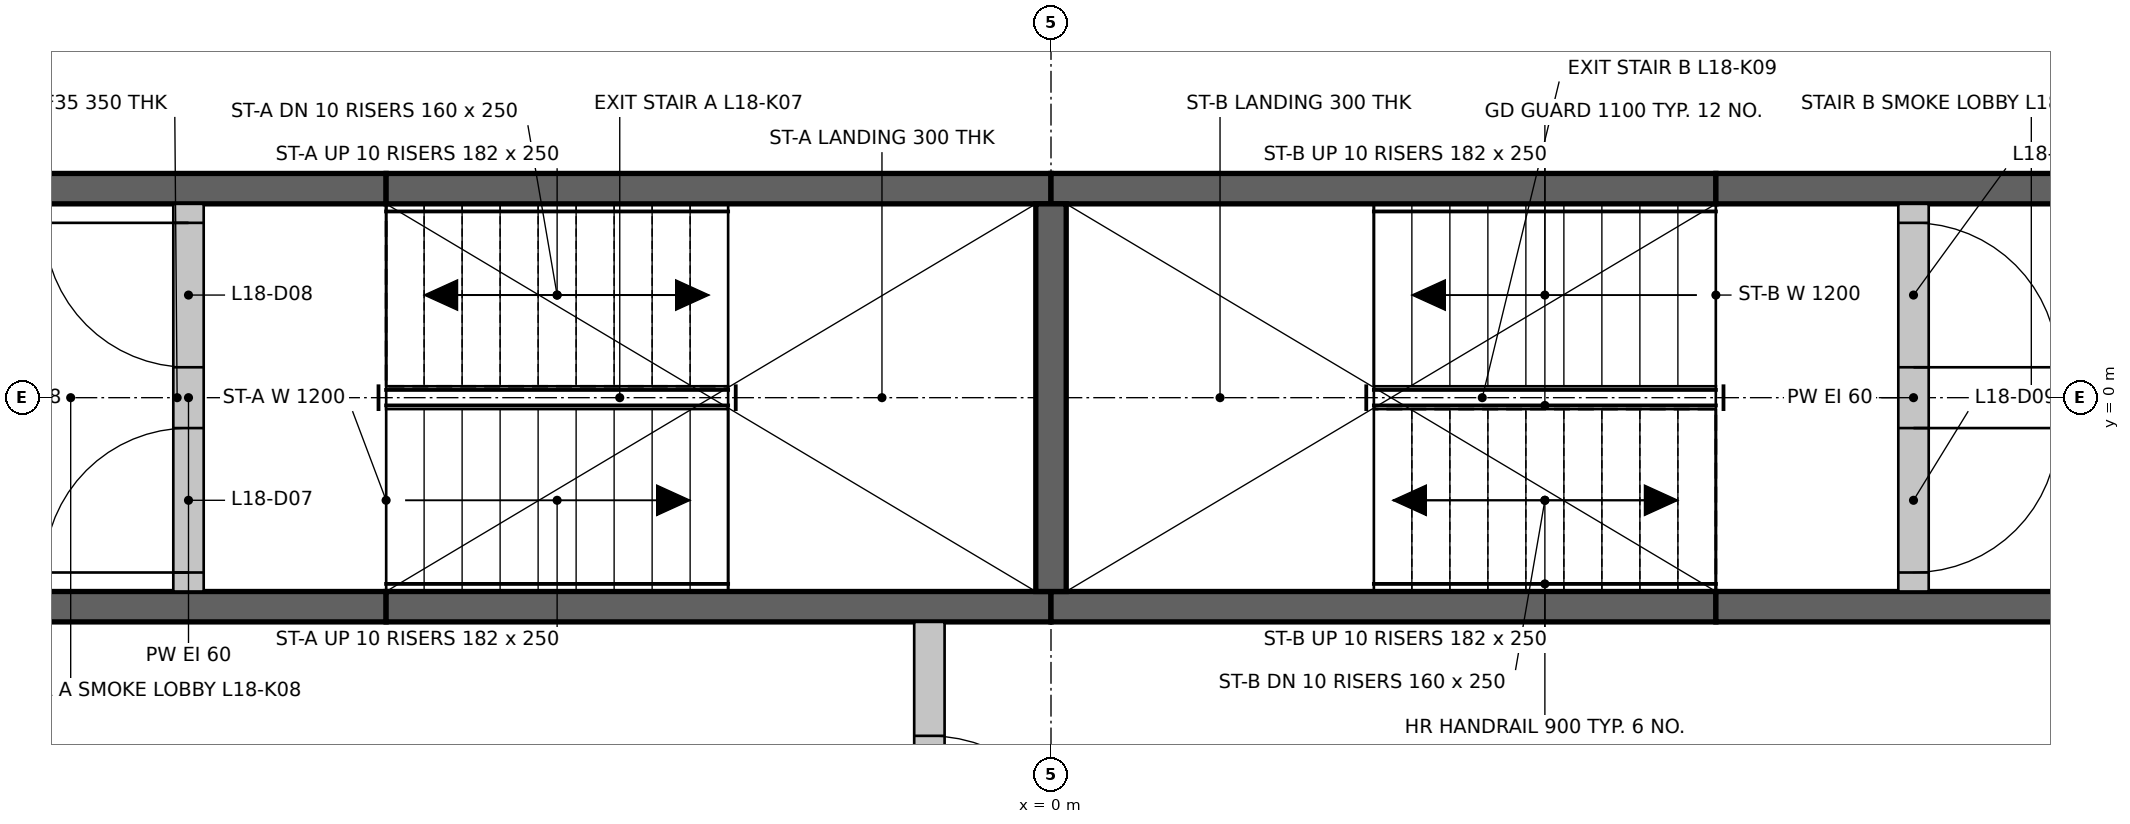
"""IFC4 building model, lengths in metres.
Left out: names, types, materials, properties, quantities, classifications, styles, units other than length and angle.
Written with IfcOpenShell. Run it as: python <this file> out.ifc"""

import sys

from ifc_helpers import new_model, si_unit, direction, frame, frame_2d, origin, place, context, subcontext, project, spatial, rectangle, extrude, element, fill, save


model = new_model("IFC4")
c1 = context("Model", 3, precision=1e-05, world=origin(), true_north=direction((0.0, 1.0)))
c2 = subcontext(c1, "Body", "Model", "MODEL_VIEW")
j1 = project(units=[si_unit("LENGTHUNIT", "METRE"), si_unit("PLANEANGLEUNIT", "RADIAN")], contexts=[c1])
p1 = place(None, origin())
s1 = spatial("IfcSite", under=j1, at=p1, CompositionType="ELEMENT")
p2 = place(p1, origin())
s2 = spatial("IfcBuilding", under=s1, at=p2, CompositionType="ELEMENT")
p3 = place(p2, frame((0.0, 0.0, 72.75)))
s3 = spatial("IfcBuildingStorey", under=s2, at=p3, CompositionType="ELEMENT", Elevation=72.75)
p4 = place(p3, frame((-7.124, -1.375, 0.0), z_axis=(0.0, 0.0, 1.0), x_axis=(1.0, 0.0, 0.0)))
e1 = element("IfcWall", 1, at=p4, inside=s3, PredefinedType="SHEAR", context=c2, shape_type="SweptSolid", body=[
    extrude(rectangle(XDim=2.75, YDim=0.2, at=frame_2d((1.375, 0.0))), origin(), (0.0, 0.0, 1.0), 3.3),
])
for number, where, z_axis, x_axis in (
    (2, (-4.374, -1.375, 0.0), (0.0, 0.0, 1.0), (1.0, 0.0, 0.0)),
    (3, (0.0, -1.375, 0.0), (0.0, 0.0, 1.0), (1.0, 0.0, 0.0)),
):
    element("IfcWall", number, at=place(p3, frame(where, z_axis=z_axis, x_axis=x_axis)), inside=s3, PredefinedType="SHEAR", context=c2, shape_type="SweptSolid", body=[
        extrude(rectangle(XDim=4.374, YDim=0.2, at=frame_2d((2.187, 0.0))), origin(), (0.0, 0.0, 1.0), 3.3),
    ])
for number, where, z_axis, x_axis in (
    (4, (4.374, -1.375, 0.0), (0.0, 0.0, 1.0), (1.0, 0.0, 0.0)),
    (5, (-7.124, 1.375, 0.0), (0.0, 0.0, 1.0), (1.0, 0.0, 0.0)),
):
    element("IfcWall", number, at=place(p3, frame(where, z_axis=z_axis, x_axis=x_axis)), inside=s3, PredefinedType="SHEAR", context=c2, shape_type="SweptSolid", body=[
        extrude(rectangle(XDim=2.75, YDim=0.2, at=frame_2d((1.375, 0.0))), origin(), (0.0, 0.0, 1.0), 3.3),
    ])
for number, where, z_axis, x_axis in (
    (6, (-4.374, 1.375, 0.0), (0.0, 0.0, 1.0), (1.0, 0.0, 0.0)),
    (7, (0.0, 1.375, 0.0), (0.0, 0.0, 1.0), (1.0, 0.0, 0.0)),
):
    element("IfcWall", number, at=place(p3, frame(where, z_axis=z_axis, x_axis=x_axis)), inside=s3, PredefinedType="SHEAR", context=c2, shape_type="SweptSolid", body=[
        extrude(rectangle(XDim=4.374, YDim=0.2, at=frame_2d((2.187, 0.0))), origin(), (0.0, 0.0, 1.0), 3.3),
    ])
p5 = place(p3, frame((4.374, 1.375, 0.0), z_axis=(0.0, 0.0, 1.0), x_axis=(1.0, 0.0, 0.0)))
e8 = element("IfcWall", 8, at=p5, inside=s3, PredefinedType="SHEAR", context=c2, shape_type="SweptSolid", body=[
    extrude(rectangle(XDim=2.75, YDim=0.2, at=frame_2d((1.375, 0.0))), origin(), (0.0, 0.0, 1.0), 3.3),
])
p6 = place(p3, frame((0.0, -1.275, 0.0), z_axis=(0.0, 0.0, 1.0), x_axis=(0.0, 1.0, 0.0)))
e9 = element("IfcWall", 9, at=p6, inside=s3, PredefinedType="SHEAR", context=c2, shape_type="SweptSolid", body=[
    extrude(rectangle(XDim=2.55, YDim=0.2, at=frame_2d((1.275, 0.0))), origin(), (0.0, 0.0, 1.0), 3.3),
])
p7 = place(p3, frame((-0.8, -3.974, 0.0), z_axis=(0.0, 0.0, 1.0), x_axis=(0.0, 1.0, 0.0)))
e10 = element("IfcWall", 10, at=p7, inside=s3, PredefinedType="PARTITIONING", context=c2, shape_type="SweptSolid", body=[
    extrude(rectangle(XDim=2.499, YDim=0.2, at=frame_2d((1.25, 0.0))), origin(), (0.0, 0.0, 1.0), 3.3),
])
p8 = place(p7, frame((0.75, 0.0, 0.0)))
e11 = element("IfcOpeningElement", 11, at=p8, cuts=e10, PredefinedType="OPENING", context=c2, shape_type="SweptSolid", body=[
    extrude(rectangle(XDim=1.0, YDim=2.1, at=frame_2d((0.5, 1.05))), frame((0.0, 0.11, 0.0), z_axis=(0.0, -1.0, 0.0), x_axis=(1.0, 0.0, 0.0)), (0.0, 0.0, 1.0), 0.22),
])
p9 = place(p3, frame((-5.674, -1.275, 0.0), z_axis=(0.0, 0.0, 1.0), x_axis=(0.0, 1.0, 0.0)))
e12 = element("IfcWall", 12, at=p9, inside=s3, PredefinedType="PARTITIONING", context=c2, shape_type="SweptSolid", body=[
    extrude(rectangle(XDim=2.55, YDim=0.2, at=frame_2d((1.275, 0.0))), origin(), (0.0, 0.0, 1.0), 3.3),
])
p10 = place(p9, frame((0.125, 0.0, 0.0)))
e13 = element("IfcOpeningElement", 13, at=p10, cuts=e12, PredefinedType="OPENING", context=c2, shape_type="SweptSolid", body=[
    extrude(rectangle(XDim=0.95, YDim=2.1, at=frame_2d((0.475, 1.05))), frame((0.0, 0.11, 0.0), z_axis=(0.0, -1.0, 0.0), x_axis=(1.0, 0.0, 0.0)), (0.0, 0.0, 1.0), 0.22),
])
p11 = place(p9, frame((1.475, 0.0, 0.0)))
e14 = element("IfcOpeningElement", 14, at=p11, cuts=e12, PredefinedType="OPENING", context=c2, shape_type="SweptSolid", body=[
    extrude(rectangle(XDim=0.95, YDim=2.1, at=frame_2d((0.475, 1.05))), frame((0.0, 0.11, 0.0), z_axis=(0.0, -1.0, 0.0), x_axis=(1.0, 0.0, 0.0)), (0.0, 0.0, 1.0), 0.22),
])
p12 = place(p3, frame((5.674, -1.275, 0.0), z_axis=(0.0, 0.0, 1.0), x_axis=(0.0, 1.0, 0.0)))
e15 = element("IfcWall", 15, at=p12, inside=s3, PredefinedType="PARTITIONING", context=c2, shape_type="SweptSolid", body=[
    extrude(rectangle(XDim=2.55, YDim=0.2, at=frame_2d((1.275, 0.0))), origin(), (0.0, 0.0, 1.0), 3.3),
])
p13 = place(p12, frame((0.125, 0.0, 0.0)))
e16 = element("IfcOpeningElement", 16, at=p13, cuts=e15, PredefinedType="OPENING", context=c2, shape_type="SweptSolid", body=[
    extrude(rectangle(XDim=0.95, YDim=2.1, at=frame_2d((0.475, 1.05))), frame((0.0, 0.11, 0.0), z_axis=(0.0, -1.0, 0.0), x_axis=(1.0, 0.0, 0.0)), (0.0, 0.0, 1.0), 0.22),
])
p14 = place(p12, frame((1.475, 0.0, 0.0)))
e17 = element("IfcOpeningElement", 17, at=p14, cuts=e15, PredefinedType="OPENING", context=c2, shape_type="SweptSolid", body=[
    extrude(rectangle(XDim=0.95, YDim=2.1, at=frame_2d((0.475, 1.05))), frame((0.0, 0.11, 0.0), z_axis=(0.0, -1.0, 0.0), x_axis=(1.0, 0.0, 0.0)), (0.0, 0.0, 1.0), 0.22),
])
p15 = place(p10, origin())
e18 = element("IfcDoor", 18, at=p15, inside=s3, OperationType="SINGLE_SWING_LEFT", PredefinedType="DOOR", context=c2, shape_type="SweptSolid", body=[
    extrude(rectangle(XDim=0.95, YDim=2.1, at=frame_2d((0.475, 1.05))), frame((0.0, 0.025, 0.0), z_axis=(0.0, -1.0, 0.0), x_axis=(1.0, 0.0, 0.0)), (0.0, 0.0, 1.0), 0.05),
])
fill(e13, e18)
p16 = place(p11, origin())
e19 = element("IfcDoor", 19, at=p16, inside=s3, OperationType="SINGLE_SWING_RIGHT", PredefinedType="DOOR", context=c2, shape_type="SweptSolid", body=[
    extrude(rectangle(XDim=0.95, YDim=2.1, at=frame_2d((0.475, 1.05))), frame((0.0, 0.025, 0.0), z_axis=(0.0, -1.0, 0.0), x_axis=(1.0, 0.0, 0.0)), (0.0, 0.0, 1.0), 0.05),
])
fill(e14, e19)
p17 = place(p13, frame((0.95, 0.0, 0.0), z_axis=(0.0, 0.0, 1.0), x_axis=(-1.0, 0.0, 0.0)))
e20 = element("IfcDoor", 20, at=p17, inside=s3, OperationType="SINGLE_SWING_RIGHT", PredefinedType="DOOR", context=c2, shape_type="SweptSolid", body=[
    extrude(rectangle(XDim=0.95, YDim=2.1, at=frame_2d((0.475, 1.05))), frame((0.0, 0.025, 0.0), z_axis=(0.0, -1.0, 0.0), x_axis=(1.0, 0.0, 0.0)), (0.0, 0.0, 1.0), 0.05),
])
fill(e16, e20)
p18 = place(p14, frame((0.95, 0.0, 0.0), z_axis=(0.0, 0.0, 1.0), x_axis=(-1.0, 0.0, 0.0)))
e21 = element("IfcDoor", 21, at=p18, inside=s3, OperationType="SINGLE_SWING_LEFT", PredefinedType="DOOR", context=c2, shape_type="SweptSolid", body=[
    extrude(rectangle(XDim=0.95, YDim=2.1, at=frame_2d((0.475, 1.05))), frame((0.0, 0.025, 0.0), z_axis=(0.0, -1.0, 0.0), x_axis=(1.0, 0.0, 0.0)), (0.0, 0.0, 1.0), 0.05),
])
fill(e17, e21)
p19 = place(p8, frame((1.0, 0.0, 0.0), z_axis=(0.0, 0.0, 1.0), x_axis=(-1.0, 0.0, 0.0)))
e22 = element("IfcDoor", 22, at=p19, inside=s3, OperationType="SINGLE_SWING_LEFT", PredefinedType="DOOR", context=c2, shape_type="SweptSolid", body=[
    extrude(rectangle(XDim=1.0, YDim=2.1, at=frame_2d((0.5, 1.05))), frame((0.0, 0.025, 0.0), z_axis=(0.0, -1.0, 0.0), x_axis=(1.0, 0.0, 0.0)), (0.0, 0.0, 1.0), 0.05),
])
fill(e11, e22)
save(model, sys.argv[1])
